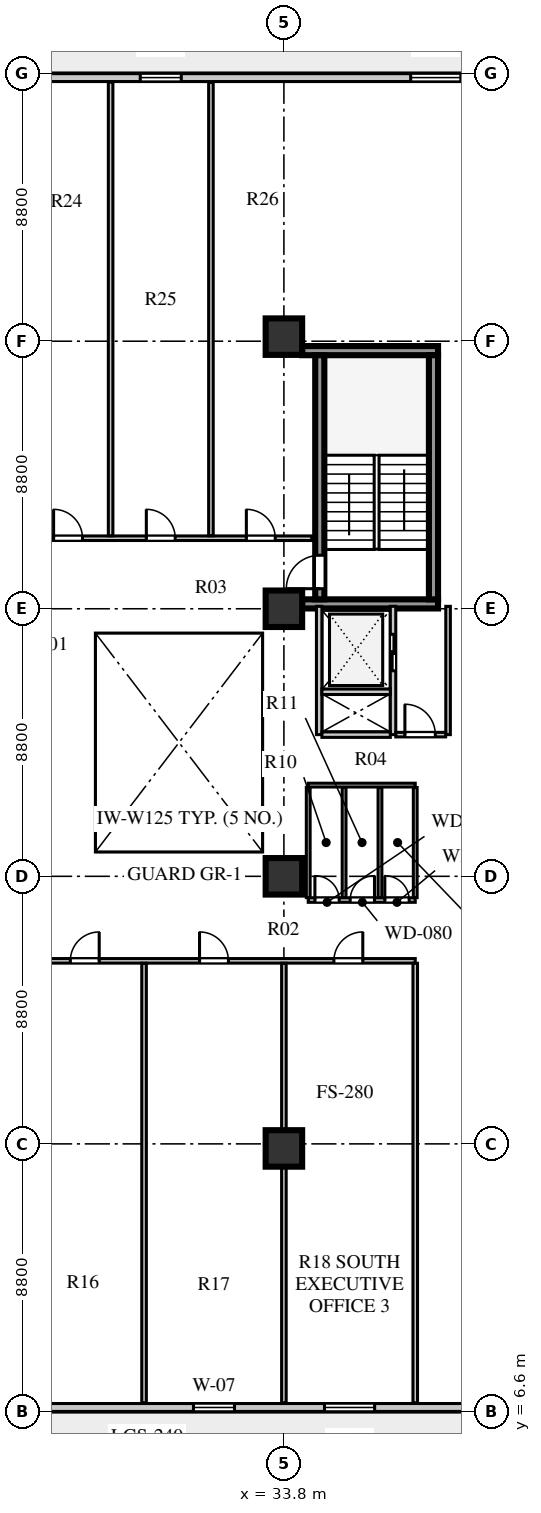
"""IFC4 building model, lengths in metres.
Left out: names, types, materials, properties, quantities, classifications, styles, units other than length and angle.
Written with IfcOpenShell. Run it as: python <this file> out.ifc"""

import sys

from ifc_helpers import new_model, si_unit, direction, frame, frame_2d, origin, origin_2d, place, context, subcontext, project, spatial, rectangle, extrude, element, fill, save


model = new_model("IFC4")
c1 = context("Model", 3, precision=1e-05, world=origin(), true_north=direction((0.0, 1.0)))
c2 = subcontext(c1, "Body", "Model", "MODEL_VIEW")
j1 = project(units=[si_unit("LENGTHUNIT", "METRE"), si_unit("PLANEANGLEUNIT", "RADIAN")], contexts=[c1])
p1 = place(None, origin())
s1 = spatial("IfcSite", under=j1, at=p1, CompositionType="ELEMENT")
p2 = place(p1, origin())
s2 = spatial("IfcBuilding", under=s1, at=p2, CompositionType="ELEMENT")
p3 = place(p2, frame((0.0, 0.0, 58.0)))
s3 = spatial("IfcBuildingStorey", under=s2, at=p3, CompositionType="ELEMENT", Elevation=58.0)
for number, where, z_axis, x_axis in (
    (1, (34.4, 33.16, 0.0), (0.0, 0.0, 1.0), (1.0, 0.0, 0.0)),
    (2, (34.4, 41.49, 0.0), (0.0, 0.0, 1.0), (1.0, 0.0, 0.0)),
):
    element("IfcWall", number, at=place(p3, frame(where, z_axis=z_axis, x_axis=x_axis)), inside=s3, PredefinedType="SHEAR", context=c2, shape_type="SweptSolid", body=[
        extrude(rectangle(XDim=4.47, YDim=0.3, at=frame_2d((2.235, 0.0))), origin(), (0.0, 0.0, 1.0), 3.72),
    ])
p4 = place(p3, frame((34.98, 33.31, 0.0), z_axis=(0.0, 0.0, 1.0), x_axis=(0.0, 1.0, 0.0)))
e3 = element("IfcWall", 3, at=p4, inside=s3, PredefinedType="SHEAR", context=c2, shape_type="SweptSolid", body=[
    extrude(rectangle(XDim=8.03, YDim=0.3, at=frame_2d((4.015, 0.0))), origin(), (0.0, 0.0, 1.0), 3.72),
])
p5 = place(p4, frame((0.35, 0.0, 0.0)))
e4 = element("IfcOpeningElement", 4, at=p5, cuts=e3, PredefinedType="OPENING", context=c2, shape_type="SweptSolid", body=[
    extrude(rectangle(XDim=1.1, YDim=2.1, at=frame_2d((0.55, 1.05))), frame((0.0, 0.16, 0.0), z_axis=(0.0, -1.0, 0.0), x_axis=(1.0, 0.0, 0.0)), (0.0, 0.0, 1.0), 0.32),
])
p6 = place(p3, frame((38.72, 33.31, 0.0), z_axis=(0.0, 0.0, 1.0), x_axis=(0.0, 1.0, 0.0)))
e5 = element("IfcWall", 5, at=p6, inside=s3, PredefinedType="SHEAR", context=c2, shape_type="SweptSolid", body=[
    extrude(rectangle(XDim=8.03, YDim=0.3, at=frame_2d((4.015, 0.0))), origin(), (0.0, 0.0, 1.0), 3.72),
])
for number, where, z_axis, x_axis in (
    (6, (33.8, 15.25, 0.0), (0.0, 0.0, 1.0), (1.0, 0.0, 0.0)),
    (7, (33.8, 24.2, 0.0), (0.0, 0.0, 1.0), (1.0, 0.0, 0.0)),
    (8, (33.8, 33.0, 0.0), (0.0, 0.0, 1.0), (1.0, 0.0, 0.0)),
    (9, (33.8, 41.95, 0.0), (0.0, 0.0, 1.0), (1.0, 0.0, 0.0)),
):
    element("IfcColumn", number, at=place(p3, frame(where, z_axis=z_axis, x_axis=x_axis)), inside=s3, PredefinedType="COLUMN", context=c2, shape_type="SweptSolid", body=[
        extrude(rectangle(XDim=1.2, YDim=1.2, at=origin_2d()), origin(), (0.0, 0.0, 1.0), 3.72),
    ])
p7 = place(p3, frame((12.3, 6.73, 0.0), z_axis=(0.0, 0.0, 1.0), x_axis=(1.0, 0.0, 0.0)))
e10 = element("IfcWall", 10, at=p7, inside=s3, PredefinedType="SOLIDWALL", context=c2, shape_type="SweptSolid", body=[
    extrude(rectangle(XDim=34.0, YDim=0.26, at=frame_2d((17.0, 0.0))), origin(), (0.0, 0.0, 1.0), 3.72),
])
p8 = place(p7, frame((0.95, 0.0, 0.0)))
e11 = element("IfcOpeningElement", 11, at=p8, cuts=e10, PredefinedType="OPENING", context=c2, shape_type="SweptSolid", body=[
    extrude(rectangle(XDim=1.0, YDim=2.05, at=frame_2d((0.5, 1.025))), frame((0.0, 0.14, 0.0), z_axis=(0.0, -1.0, 0.0), x_axis=(1.0, 0.0, 0.0)), (0.0, 0.0, 1.0), 0.28),
])
p9 = place(p7, frame((8.23, 0.0, 0.8)))
e12 = element("IfcOpeningElement", 12, at=p9, cuts=e10, PredefinedType="OPENING", context=c2, shape_type="SweptSolid", body=[
    extrude(rectangle(XDim=2.1, YDim=1.95, at=frame_2d((1.05, 0.975))), frame((0.0, 0.14, 0.0), z_axis=(0.0, -1.0, 0.0), x_axis=(1.0, 0.0, 0.0)), (0.0, 0.0, 1.0), 0.28),
])
p10 = place(p7, frame((18.525, 0.0, 0.8)))
e13 = element("IfcOpeningElement", 13, at=p10, cuts=e10, PredefinedType="OPENING", context=c2, shape_type="SweptSolid", body=[
    extrude(rectangle(XDim=1.35, YDim=1.9, at=frame_2d((0.675, 0.95))), frame((0.0, 0.14, 0.0), z_axis=(0.0, -1.0, 0.0), x_axis=(1.0, 0.0, 0.0)), (0.0, 0.0, 1.0), 0.28),
])
p11 = place(p7, frame((22.835, 0.0, 0.8)))
e14 = element("IfcOpeningElement", 14, at=p11, cuts=e10, PredefinedType="OPENING", context=c2, shape_type="SweptSolid", body=[
    extrude(rectangle(XDim=1.65, YDim=1.95, at=frame_2d((0.825, 0.975))), frame((0.0, 0.14, 0.0), z_axis=(0.0, -1.0, 0.0), x_axis=(1.0, 0.0, 0.0)), (0.0, 0.0, 1.0), 0.28),
])
p12 = place(p7, frame((28.88, 0.0, 0.8)))
e15 = element("IfcOpeningElement", 15, at=p12, cuts=e10, PredefinedType="OPENING", context=c2, shape_type="SweptSolid", body=[
    extrude(rectangle(XDim=1.95, YDim=2.0, at=frame_2d((0.975, 1.0))), frame((0.0, 0.14, 0.0), z_axis=(0.0, -1.0, 0.0), x_axis=(1.0, 0.0, 0.0)), (0.0, 0.0, 1.0), 0.28),
])
p13 = place(p3, frame((46.3, 50.47, 0.0), z_axis=(0.0, 0.0, 1.0), x_axis=(-1.0, 0.0, 0.0)))
e16 = element("IfcWall", 16, at=p13, inside=s3, PredefinedType="SOLIDWALL", context=c2, shape_type="SweptSolid", body=[
    extrude(rectangle(XDim=34.0, YDim=0.26, at=frame_2d((17.0, 0.0))), origin(), (0.0, 0.0, 1.0), 3.72),
])
p14 = place(p13, frame((32.05, 0.0, 0.0)))
e17 = element("IfcOpeningElement", 17, at=p14, cuts=e16, PredefinedType="OPENING", context=c2, shape_type="SweptSolid", body=[
    extrude(rectangle(XDim=1.0, YDim=2.05, at=frame_2d((0.5, 1.025))), frame((0.0, 0.14, 0.0), z_axis=(0.0, -1.0, 0.0), x_axis=(1.0, 0.0, 0.0)), (0.0, 0.0, 1.0), 0.28),
])
p15 = place(p13, frame((24.22, 0.0, 0.8)))
e18 = element("IfcOpeningElement", 18, at=p15, cuts=e16, PredefinedType="OPENING", context=c2, shape_type="SweptSolid", body=[
    extrude(rectangle(XDim=2.1, YDim=1.95, at=frame_2d((1.05, 0.975))), frame((0.0, 0.14, 0.0), z_axis=(0.0, -1.0, 0.0), x_axis=(1.0, 0.0, 0.0)), (0.0, 0.0, 1.0), 0.28),
])
p16 = place(p13, frame((15.875, 0.0, 0.8)))
e19 = element("IfcOpeningElement", 19, at=p16, cuts=e16, PredefinedType="OPENING", context=c2, shape_type="SweptSolid", body=[
    extrude(rectangle(XDim=1.35, YDim=1.9, at=frame_2d((0.675, 0.95))), frame((0.0, 0.14, 0.0), z_axis=(0.0, -1.0, 0.0), x_axis=(1.0, 0.0, 0.0)), (0.0, 0.0, 1.0), 0.28),
])
p17 = place(p13, frame((6.68, 0.0, 0.8)))
e20 = element("IfcOpeningElement", 20, at=p17, cuts=e16, PredefinedType="OPENING", context=c2, shape_type="SweptSolid", body=[
    extrude(rectangle(XDim=1.65, YDim=1.95, at=frame_2d((0.825, 0.975))), frame((0.0, 0.14, 0.0), z_axis=(0.0, -1.0, 0.0), x_axis=(1.0, 0.0, 0.0)), (0.0, 0.0, 1.0), 0.28),
])
p18 = place(p3, frame((34.96, 28.86, 0.0), z_axis=(0.0, 0.0, 1.0), x_axis=(0.0, 1.0, 0.0)))
e21 = element("IfcWall", 21, at=p18, inside=s3, PredefinedType="SOLIDWALL", context=c2, shape_type="SweptSolid", body=[
    extrude(rectangle(XDim=4.22, YDim=0.18, at=frame_2d((2.11, 0.0))), origin(), (0.0, 0.0, 1.0), 3.72),
])
p19 = place(p3, frame((37.39, 28.86, 0.0), z_axis=(0.0, 0.0, 1.0), x_axis=(0.0, 1.0, 0.0)))
e22 = element("IfcWall", 22, at=p19, inside=s3, PredefinedType="SOLIDWALL", context=c2, shape_type="SweptSolid", body=[
    extrude(rectangle(XDim=4.22, YDim=0.18, at=frame_2d((2.11, 0.0))), origin(), (0.0, 0.0, 1.0), 3.72),
])
p20 = place(p19, frame((2.1, 0.0, 0.0)))
e23 = element("IfcOpeningElement", 23, at=p20, cuts=e22, PredefinedType="OPENING", context=c2, shape_type="SweptSolid", body=[
    extrude(rectangle(XDim=1.2, YDim=2.12, at=frame_2d((0.6, 1.06))), frame((0.0, 0.1, 0.0), z_axis=(0.0, -1.0, 0.0), x_axis=(1.0, 0.0, 0.0)), (0.0, 0.0, 1.0), 0.2),
])
for number, where, z_axis, x_axis in (
    (24, (35.05, 28.86, 0.0), (0.0, 0.0, 1.0), (1.0, 0.0, 0.0)),
    (25, (35.05, 30.27, 0.0), (0.0, 0.0, 1.0), (1.0, 0.0, 0.0)),
):
    element("IfcWall", number, at=place(p3, frame(where, z_axis=z_axis, x_axis=x_axis)), inside=s3, PredefinedType="SOLIDWALL", context=c2, shape_type="SweptSolid", body=[
        extrude(rectangle(XDim=2.25, YDim=0.18, at=frame_2d((1.125, 0.0))), origin(), (0.0, 0.0, 1.0), 3.72),
    ])
p21 = place(p3, frame((39.2, 28.86, 0.0), z_axis=(0.0, 0.0, 1.0), x_axis=(0.0, 1.0, 0.0)))
e26 = element("IfcWall", 26, at=p21, inside=s3, PredefinedType="PARTITIONING", context=c2, shape_type="SweptSolid", body=[
    extrude(rectangle(XDim=4.22, YDim=0.15, at=frame_2d((2.11, 0.0))), origin(), (0.0, 0.0, 1.0), 3.72),
])
p22 = place(p3, frame((37.48, 28.86, 0.0), z_axis=(0.0, 0.0, 1.0), x_axis=(1.0, 0.0, 0.0)))
e27 = element("IfcWall", 27, at=p22, inside=s3, PredefinedType="PARTITIONING", context=c2, shape_type="SweptSolid", body=[
    extrude(rectangle(XDim=1.64, YDim=0.15, at=frame_2d((0.82, 0.0))), origin(), (0.0, 0.0, 1.0), 3.72),
])
p23 = place(p22, frame((0.3, 0.0, 0.0)))
e28 = element("IfcOpeningElement", 28, at=p23, cuts=e27, PredefinedType="OPENING", context=c2, shape_type="SweptSolid", body=[
    extrude(rectangle(XDim=1.0, YDim=2.1, at=frame_2d((0.5, 1.05))), frame((0.0, 0.085, 0.0), z_axis=(0.0, -1.0, 0.0), x_axis=(1.0, 0.0, 0.0)), (0.0, 0.0, 1.0), 0.17),
])
p24 = place(p3, frame((25.25, 21.42, 0.0), z_axis=(0.0, 0.0, 1.0), x_axis=(1.0, 0.0, 0.0)))
e29 = element("IfcWall", 29, at=p24, inside=s3, PredefinedType="PARTITIONING", context=c2, shape_type="SweptSolid", body=[
    extrude(rectangle(XDim=12.87, YDim=0.15, at=frame_2d((6.435, 0.0))), origin(), (0.0, 0.0, 1.0), 3.32),
])
p25 = place(p24, frame((1.525, 0.0, 0.0)))
e30 = element("IfcOpeningElement", 30, at=p25, cuts=e29, PredefinedType="OPENING", context=c2, shape_type="SweptSolid", body=[
    extrude(rectangle(XDim=0.95, YDim=2.08, at=frame_2d((0.475, 1.04))), frame((0.0, 0.085, 0.0), z_axis=(0.0, -1.0, 0.0), x_axis=(1.0, 0.0, 0.0)), (0.0, 0.0, 1.0), 0.17),
])
p26 = place(p24, frame((5.775, 0.0, 0.0)))
e31 = element("IfcOpeningElement", 31, at=p26, cuts=e29, PredefinedType="OPENING", context=c2, shape_type="SweptSolid", body=[
    extrude(rectangle(XDim=0.95, YDim=2.08, at=frame_2d((0.475, 1.04))), frame((0.0, 0.085, 0.0), z_axis=(0.0, -1.0, 0.0), x_axis=(1.0, 0.0, 0.0)), (0.0, 0.0, 1.0), 0.17),
])
p27 = place(p24, frame((10.195, 0.0, 0.0)))
e32 = element("IfcOpeningElement", 32, at=p27, cuts=e29, PredefinedType="OPENING", context=c2, shape_type="SweptSolid", body=[
    extrude(rectangle(XDim=0.95, YDim=2.08, at=frame_2d((0.475, 1.04))), frame((0.0, 0.085, 0.0), z_axis=(0.0, -1.0, 0.0), x_axis=(1.0, 0.0, 0.0)), (0.0, 0.0, 1.0), 0.17),
])
p28 = place(p3, frame((38.12, 6.88, 0.0), z_axis=(0.0, 0.0, 1.0), x_axis=(0.0, 1.0, 0.0)))
e33 = element("IfcWall", 33, at=p28, inside=s3, PredefinedType="PARTITIONING", context=c2, shape_type="SweptSolid", body=[
    extrude(rectangle(XDim=14.46, YDim=0.15, at=frame_2d((7.23, 0.0))), origin(), (0.0, 0.0, 1.0), 3.72),
])
p29 = place(p3, frame((34.6, 23.42, 0.0), z_axis=(0.0, 0.0, 1.0), x_axis=(1.0, 0.0, 0.0)))
e34 = element("IfcWall", 34, at=p29, inside=s3, PredefinedType="PARTITIONING", context=c2, shape_type="SweptSolid", body=[
    extrude(rectangle(XDim=3.52, YDim=0.15, at=frame_2d((1.76, 0.0))), origin(), (0.0, 0.0, 1.0), 3.72),
])
p30 = place(p29, frame((0.22, 0.0, 0.0)))
e35 = element("IfcOpeningElement", 35, at=p30, cuts=e34, PredefinedType="OPENING", context=c2, shape_type="SweptSolid", body=[
    extrude(rectangle(XDim=0.8, YDim=2.05, at=frame_2d((0.4, 1.025))), frame((0.0, 0.085, 0.0), z_axis=(0.0, -1.0, 0.0), x_axis=(1.0, 0.0, 0.0)), (0.0, 0.0, 1.0), 0.17),
])
p31 = place(p29, frame((1.38, 0.0, 0.0)))
e36 = element("IfcOpeningElement", 36, at=p31, cuts=e34, PredefinedType="OPENING", context=c2, shape_type="SweptSolid", body=[
    extrude(rectangle(XDim=0.8, YDim=2.05, at=frame_2d((0.4, 1.025))), frame((0.0, 0.085, 0.0), z_axis=(0.0, -1.0, 0.0), x_axis=(1.0, 0.0, 0.0)), (0.0, 0.0, 1.0), 0.17),
])
p32 = place(p29, frame((2.52, 0.0, 0.0)))
e37 = element("IfcOpeningElement", 37, at=p32, cuts=e34, PredefinedType="OPENING", context=c2, shape_type="SweptSolid", body=[
    extrude(rectangle(XDim=0.8, YDim=2.05, at=frame_2d((0.4, 1.025))), frame((0.0, 0.085, 0.0), z_axis=(0.0, -1.0, 0.0), x_axis=(1.0, 0.0, 0.0)), (0.0, 0.0, 1.0), 0.17),
])
p33 = place(p3, frame((25.25, 35.32, 0.0), z_axis=(0.0, 0.0, 1.0), x_axis=(1.0, 0.0, 0.0)))
e38 = element("IfcWall", 38, at=p33, inside=s3, PredefinedType="PARTITIONING", context=c2, shape_type="SweptSolid", body=[
    extrude(rectangle(XDim=9.47, YDim=0.15, at=frame_2d((4.735, 0.0))), origin(), (0.0, 0.0, 1.0), 3.72),
])
p34 = place(p33, frame((0.975, 0.0, 0.0)))
e39 = element("IfcOpeningElement", 39, at=p34, cuts=e38, PredefinedType="OPENING", context=c2, shape_type="SweptSolid", body=[
    extrude(rectangle(XDim=0.95, YDim=2.08, at=frame_2d((0.475, 1.04))), frame((0.0, 0.085, 0.0), z_axis=(0.0, -1.0, 0.0), x_axis=(1.0, 0.0, 0.0)), (0.0, 0.0, 1.0), 0.17),
])
p35 = place(p33, frame((4.025, 0.0, 0.0)))
e40 = element("IfcOpeningElement", 40, at=p35, cuts=e38, PredefinedType="OPENING", context=c2, shape_type="SweptSolid", body=[
    extrude(rectangle(XDim=0.95, YDim=2.08, at=frame_2d((0.475, 1.04))), frame((0.0, 0.085, 0.0), z_axis=(0.0, -1.0, 0.0), x_axis=(1.0, 0.0, 0.0)), (0.0, 0.0, 1.0), 0.17),
])
p36 = place(p33, frame((7.315, 0.0, 0.0)))
e41 = element("IfcOpeningElement", 41, at=p36, cuts=e38, PredefinedType="OPENING", context=c2, shape_type="SweptSolid", body=[
    extrude(rectangle(XDim=0.95, YDim=2.08, at=frame_2d((0.475, 1.04))), frame((0.0, 0.085, 0.0), z_axis=(0.0, -1.0, 0.0), x_axis=(1.0, 0.0, 0.0)), (0.0, 0.0, 1.0), 0.17),
])
p37 = place(p3, frame((34.6, 27.2, 0.0), z_axis=(0.0, 0.0, 1.0), x_axis=(1.0, 0.0, 0.0)))
e42 = element("IfcWall", 42, at=p37, inside=s3, PredefinedType="PLUMBINGWALL", context=c2, shape_type="SweptSolid", body=[
    extrude(rectangle(XDim=3.52, YDim=0.125, at=frame_2d((1.76, 0.0))), origin(), (0.0, 0.0, 1.0), 3.32),
])
for number, where, z_axis, x_axis in (
    (43, (34.6, 23.5, 0.0), (0.0, 0.0, 1.0), (0.0, 1.0, 0.0)),
    (44, (38.12, 23.5, 0.0), (0.0, 0.0, 1.0), (0.0, 1.0, 0.0)),
    (45, (35.78, 23.5, 0.0), (0.0, 0.0, 1.0), (0.0, 1.0, 0.0)),
    (46, (36.96, 23.5, 0.0), (0.0, 0.0, 1.0), (0.0, 1.0, 0.0)),
):
    element("IfcWall", number, at=place(p3, frame(where, z_axis=z_axis, x_axis=x_axis)), inside=s3, PredefinedType="PLUMBINGWALL", context=c2, shape_type="SweptSolid", body=[
        extrude(rectangle(XDim=3.62, YDim=0.125, at=frame_2d((1.81, 0.0))), origin(), (0.0, 0.0, 1.0), 3.72),
    ])
p38 = place(p3, frame((29.2, 6.88, 0.0), z_axis=(0.0, 0.0, 1.0), x_axis=(0.0, 1.0, 0.0)))
e47 = element("IfcWall", 47, at=p38, inside=s3, PredefinedType="PARTITIONING", context=c2, shape_type="SweptSolid", body=[
    extrude(rectangle(XDim=14.46, YDim=0.15, at=frame_2d((7.23, 0.0))), origin(), (0.0, 0.0, 1.0), 3.72),
])
p39 = place(p3, frame((33.8, 6.88, 0.0), z_axis=(0.0, 0.0, 1.0), x_axis=(0.0, 1.0, 0.0)))
e48 = element("IfcWall", 48, at=p39, inside=s3, PredefinedType="PARTITIONING", context=c2, shape_type="SweptSolid", body=[
    extrude(rectangle(XDim=14.46, YDim=0.15, at=frame_2d((7.23, 0.0))), origin(), (0.0, 0.0, 1.0), 3.02),
])
for number, where, z_axis, x_axis in (
    (49, (28.1, 35.4, 0.0), (0.0, 0.0, 1.0), (0.0, 1.0, 0.0)),
    (50, (31.4, 35.4, 0.0), (0.0, 0.0, 1.0), (0.0, 1.0, 0.0)),
):
    element("IfcWall", number, at=place(p3, frame(where, z_axis=z_axis, x_axis=x_axis)), inside=s3, PredefinedType="PARTITIONING", context=c2, shape_type="SweptSolid", body=[
        extrude(rectangle(XDim=14.92, YDim=0.15, at=frame_2d((7.46, 0.0))), origin(), (0.0, 0.0, 1.0), 3.72),
    ])
p40 = place(p10, origin())
e51 = element("IfcWindow", 51, at=p40, inside=s3, PartitioningType="SINGLE_PANEL", PredefinedType="WINDOW", context=c2, shape_type="SweptSolid", body=[
    extrude(rectangle(XDim=1.35, YDim=1.9, at=frame_2d((0.675, 0.95))), frame((0.0, 0.03, 0.0), z_axis=(0.0, -1.0, 0.0), x_axis=(1.0, 0.0, 0.0)), (0.0, 0.0, 1.0), 0.06),
])
fill(e13, e51)
p41 = place(p11, origin())
e52 = element("IfcWindow", 52, at=p41, inside=s3, PartitioningType="SINGLE_PANEL", PredefinedType="WINDOW", context=c2, shape_type="SweptSolid", body=[
    extrude(rectangle(XDim=1.65, YDim=1.95, at=frame_2d((0.825, 0.975))), frame((0.0, 0.03, 0.0), z_axis=(0.0, -1.0, 0.0), x_axis=(1.0, 0.0, 0.0)), (0.0, 0.0, 1.0), 0.06),
])
fill(e14, e52)
p42 = place(p16, origin())
e53 = element("IfcWindow", 53, at=p42, inside=s3, PartitioningType="SINGLE_PANEL", PredefinedType="WINDOW", context=c2, shape_type="SweptSolid", body=[
    extrude(rectangle(XDim=1.35, YDim=1.9, at=frame_2d((0.675, 0.95))), frame((0.0, 0.03, 0.0), z_axis=(0.0, -1.0, 0.0), x_axis=(1.0, 0.0, 0.0)), (0.0, 0.0, 1.0), 0.06),
])
fill(e19, e53)
p43 = place(p17, origin())
e54 = element("IfcWindow", 54, at=p43, inside=s3, PartitioningType="SINGLE_PANEL", PredefinedType="WINDOW", context=c2, shape_type="SweptSolid", body=[
    extrude(rectangle(XDim=1.65, YDim=1.95, at=frame_2d((0.825, 0.975))), frame((0.0, 0.03, 0.0), z_axis=(0.0, -1.0, 0.0), x_axis=(1.0, 0.0, 0.0)), (0.0, 0.0, 1.0), 0.06),
])
fill(e20, e54)
p44 = place(p5, origin())
e55 = element("IfcDoor", 55, at=p44, inside=s3, OperationType="SINGLE_SWING_LEFT", PredefinedType="DOOR", context=c2, shape_type="SweptSolid", body=[
    extrude(rectangle(XDim=1.1, YDim=2.1, at=frame_2d((0.55, 1.05))), frame((0.0, 0.025, 0.0), z_axis=(0.0, -1.0, 0.0), x_axis=(1.0, 0.0, 0.0)), (0.0, 0.0, 1.0), 0.05),
])
fill(e4, e55)
p45 = place(p20, frame((1.2, 0.0, 0.0), z_axis=(0.0, 0.0, 1.0), x_axis=(-1.0, 0.0, 0.0)))
e56 = element("IfcDoor", 56, at=p45, inside=s3, OperationType="DOUBLE_DOOR_SLIDING", PredefinedType="DOOR", context=c2, shape_type="SweptSolid", body=[
    extrude(rectangle(XDim=1.2, YDim=2.12, at=frame_2d((0.6, 1.06))), frame((0.0, 0.025, 0.0), z_axis=(0.0, -1.0, 0.0), x_axis=(1.0, 0.0, 0.0)), (0.0, 0.0, 1.0), 0.05),
])
fill(e23, e56)
p46 = place(p23, origin())
e57 = element("IfcDoor", 57, at=p46, inside=s3, OperationType="SINGLE_SWING_LEFT", PredefinedType="DOOR", context=c2, shape_type="SweptSolid", body=[
    extrude(rectangle(XDim=1.0, YDim=2.1, at=frame_2d((0.5, 1.05))), frame((0.0, 0.025, 0.0), z_axis=(0.0, -1.0, 0.0), x_axis=(1.0, 0.0, 0.0)), (0.0, 0.0, 1.0), 0.05),
])
fill(e28, e57)
p47 = place(p30, origin())
e58 = element("IfcDoor", 58, at=p47, inside=s3, OperationType="SINGLE_SWING_LEFT", PredefinedType="DOOR", context=c2, shape_type="SweptSolid", body=[
    extrude(rectangle(XDim=0.8, YDim=2.05, at=frame_2d((0.4, 1.025))), frame((0.0, 0.025, 0.0), z_axis=(0.0, -1.0, 0.0), x_axis=(1.0, 0.0, 0.0)), (0.0, 0.0, 1.0), 0.05),
])
fill(e35, e58)
p48 = place(p31, origin())
e59 = element("IfcDoor", 59, at=p48, inside=s3, OperationType="SINGLE_SWING_RIGHT", PredefinedType="DOOR", context=c2, shape_type="SweptSolid", body=[
    extrude(rectangle(XDim=0.8, YDim=2.05, at=frame_2d((0.4, 1.025))), frame((0.0, 0.025, 0.0), z_axis=(0.0, -1.0, 0.0), x_axis=(1.0, 0.0, 0.0)), (0.0, 0.0, 1.0), 0.05),
])
fill(e36, e59)
p49 = place(p32, origin())
e60 = element("IfcDoor", 60, at=p49, inside=s3, OperationType="SINGLE_SWING_LEFT", PredefinedType="DOOR", context=c2, shape_type="SweptSolid", body=[
    extrude(rectangle(XDim=0.8, YDim=2.05, at=frame_2d((0.4, 1.025))), frame((0.0, 0.025, 0.0), z_axis=(0.0, -1.0, 0.0), x_axis=(1.0, 0.0, 0.0)), (0.0, 0.0, 1.0), 0.05),
])
fill(e37, e60)
p50 = place(p25, frame((0.95, 0.0, 0.0), z_axis=(0.0, 0.0, 1.0), x_axis=(-1.0, 0.0, 0.0)))
e61 = element("IfcDoor", 61, at=p50, inside=s3, OperationType="SINGLE_SWING_LEFT", PredefinedType="DOOR", context=c2, shape_type="SweptSolid", body=[
    extrude(rectangle(XDim=0.95, YDim=2.08, at=frame_2d((0.475, 1.04))), frame((0.0, 0.025, 0.0), z_axis=(0.0, -1.0, 0.0), x_axis=(1.0, 0.0, 0.0)), (0.0, 0.0, 1.0), 0.05),
])
fill(e30, e61)
p51 = place(p26, frame((0.95, 0.0, 0.0), z_axis=(0.0, 0.0, 1.0), x_axis=(-1.0, 0.0, 0.0)))
e62 = element("IfcDoor", 62, at=p51, inside=s3, OperationType="SINGLE_SWING_RIGHT", PredefinedType="DOOR", context=c2, shape_type="SweptSolid", body=[
    extrude(rectangle(XDim=0.95, YDim=2.08, at=frame_2d((0.475, 1.04))), frame((0.0, 0.025, 0.0), z_axis=(0.0, -1.0, 0.0), x_axis=(1.0, 0.0, 0.0)), (0.0, 0.0, 1.0), 0.05),
])
fill(e31, e62)
p52 = place(p27, frame((0.95, 0.0, 0.0), z_axis=(0.0, 0.0, 1.0), x_axis=(-1.0, 0.0, 0.0)))
e63 = element("IfcDoor", 63, at=p52, inside=s3, OperationType="SINGLE_SWING_LEFT", PredefinedType="DOOR", context=c2, shape_type="SweptSolid", body=[
    extrude(rectangle(XDim=0.95, YDim=2.08, at=frame_2d((0.475, 1.04))), frame((0.0, 0.025, 0.0), z_axis=(0.0, -1.0, 0.0), x_axis=(1.0, 0.0, 0.0)), (0.0, 0.0, 1.0), 0.05),
])
fill(e32, e63)
p53 = place(p34, origin())
e64 = element("IfcDoor", 64, at=p53, inside=s3, OperationType="SINGLE_SWING_LEFT", PredefinedType="DOOR", context=c2, shape_type="SweptSolid", body=[
    extrude(rectangle(XDim=0.95, YDim=2.08, at=frame_2d((0.475, 1.04))), frame((0.0, 0.025, 0.0), z_axis=(0.0, -1.0, 0.0), x_axis=(1.0, 0.0, 0.0)), (0.0, 0.0, 1.0), 0.05),
])
fill(e39, e64)
p54 = place(p35, origin())
e65 = element("IfcDoor", 65, at=p54, inside=s3, OperationType="SINGLE_SWING_LEFT", PredefinedType="DOOR", context=c2, shape_type="SweptSolid", body=[
    extrude(rectangle(XDim=0.95, YDim=2.08, at=frame_2d((0.475, 1.04))), frame((0.0, 0.025, 0.0), z_axis=(0.0, -1.0, 0.0), x_axis=(1.0, 0.0, 0.0)), (0.0, 0.0, 1.0), 0.05),
])
fill(e40, e65)
p55 = place(p36, origin())
e66 = element("IfcDoor", 66, at=p55, inside=s3, OperationType="SINGLE_SWING_LEFT", PredefinedType="DOOR", context=c2, shape_type="SweptSolid", body=[
    extrude(rectangle(XDim=0.95, YDim=2.08, at=frame_2d((0.475, 1.04))), frame((0.0, 0.025, 0.0), z_axis=(0.0, -1.0, 0.0), x_axis=(1.0, 0.0, 0.0)), (0.0, 0.0, 1.0), 0.05),
])
fill(e41, e66)
save(model, sys.argv[1])
